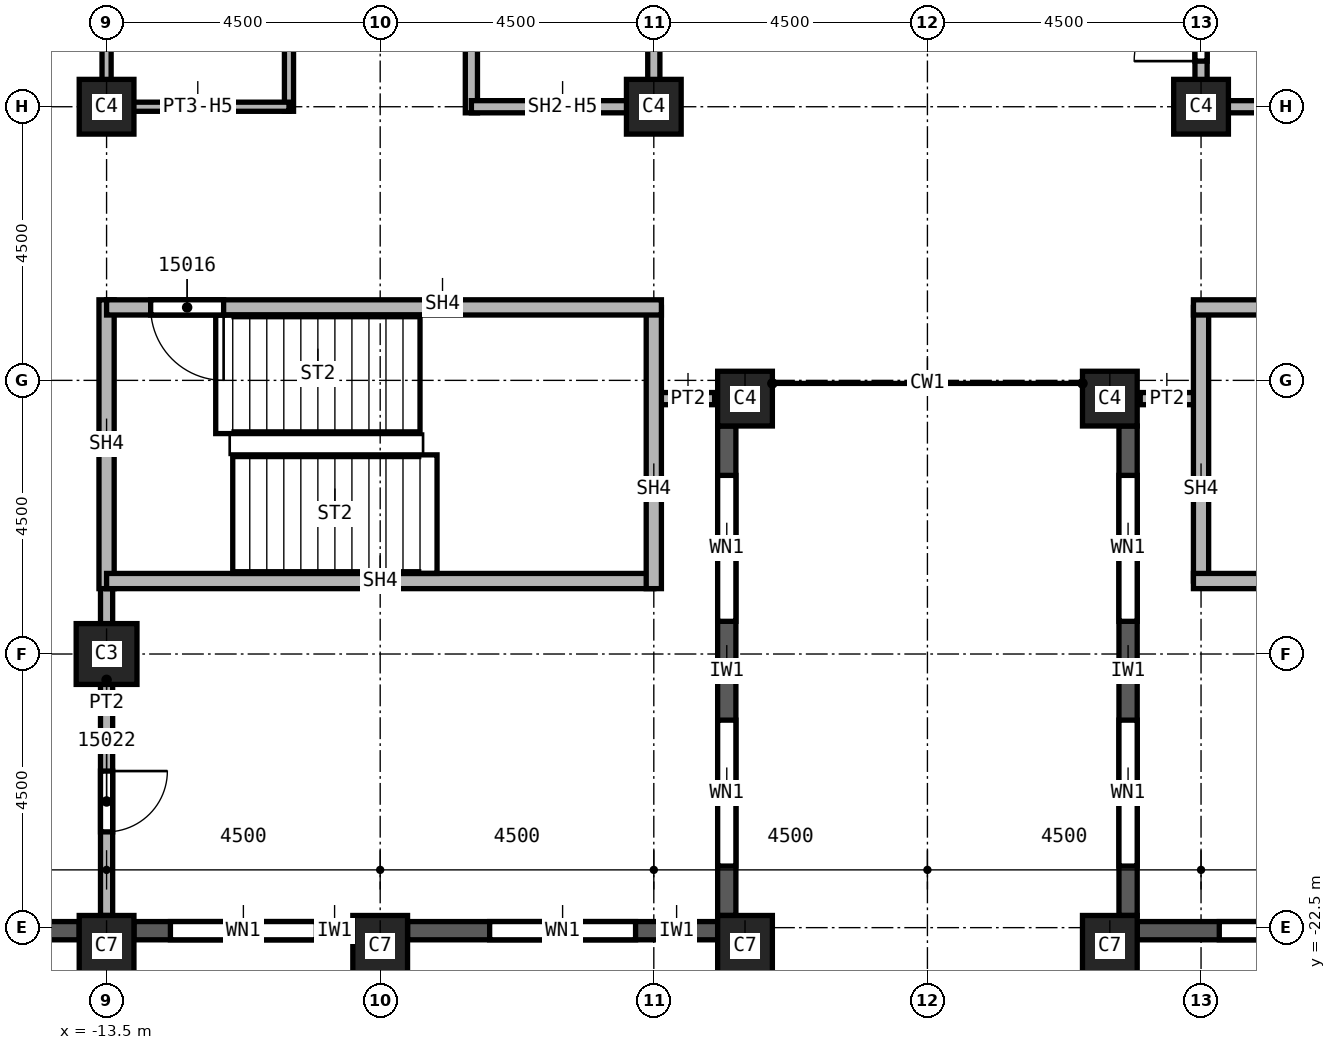
"""IFC4 building model, lengths in metres.
Left out: names, types, materials, properties, quantities, classifications, styles, units other than length and angle.
Written with IfcOpenShell. Run it as: python <this file> out.ifc"""

import sys

from ifc_helpers import new_model, si_unit, direction, frame, frame_2d, origin, origin_2d, place, context, subcontext, project, spatial, rectangle, extrude, element, fill, save


model = new_model("IFC4")
c1 = context("Model", 3, precision=1e-05, world=origin(), true_north=direction((0.0, 1.0)))
c2 = subcontext(c1, "Body", "Model", "MODEL_VIEW")
j1 = project(units=[si_unit("LENGTHUNIT", "METRE"), si_unit("PLANEANGLEUNIT", "RADIAN")], contexts=[c1])
p1 = place(None, origin())
s1 = spatial("IfcSite", under=j1, at=p1, CompositionType="ELEMENT")
p2 = place(p1, origin())
s2 = spatial("IfcBuilding", under=s1, at=p2, CompositionType="ELEMENT")
p3 = place(p2, frame((0.0, 0.0, 232.0)))
s3 = spatial("IfcBuildingStorey", under=s2, at=p3, CompositionType="ELEMENT", Elevation=232.0)
p4 = place(p3, frame((-13.5, -18.0, 0.0), z_axis=(0.0, 0.0, 1.0), x_axis=(1.0, 0.0, 0.0)))
e1 = element("IfcColumn", 1, at=p4, inside=s3, PredefinedType="COLUMN", context=c2, shape_type="SweptSolid", body=[
    extrude(rectangle(XDim=1.0, YDim=1.0, at=origin_2d()), origin(), (0.0, 0.0, 1.0), 3.6),
])
for number, where, z_axis, x_axis in (
    (2, (4.5, -9.0, 0.0), (0.0, 0.0, 1.0), (1.0, 0.0, 0.0)),
    (3, (-4.5, -9.0, 0.0), (0.0, 0.0, 1.0), (1.0, 0.0, 0.0)),
    (4, (-13.5, -9.0, 0.0), (0.0, 0.0, 1.0), (1.0, 0.0, 0.0)),
):
    element("IfcColumn", number, at=place(p3, frame(where, z_axis=z_axis, x_axis=x_axis)), inside=s3, PredefinedType="COLUMN", context=c2, shape_type="SweptSolid", body=[
        extrude(rectangle(XDim=0.9, YDim=0.9, at=origin_2d()), origin(), (0.0, 0.0, 1.0), 3.6),
    ])
for number, where, z_axis, x_axis in (
    (5, (3.0, -22.8, 0.0), (0.0, 0.0, 1.0), (1.0, 0.0, 0.0)),
    (6, (-3.0, -22.8, 0.0), (0.0, 0.0, 1.0), (1.0, 0.0, 0.0)),
    (7, (-9.0, -22.8, 0.0), (0.0, 0.0, 1.0), (1.0, 0.0, 0.0)),
    (8, (-13.5, -22.8, 0.0), (0.0, 0.0, 1.0), (1.0, 0.0, 0.0)),
):
    element("IfcColumn", number, at=place(p3, frame(where, z_axis=z_axis, x_axis=x_axis)), inside=s3, PredefinedType="COLUMN", context=c2, shape_type="SweptSolid", body=[
        extrude(rectangle(XDim=0.9, YDim=1.0, at=origin_2d()), origin(), (0.0, 0.0, 1.0), 3.6),
    ])
for number, where, z_axis, x_axis in (
    (9, (3.0, -13.8, 0.0), (0.0, 0.0, 1.0), (1.0, 0.0, 0.0)),
    (10, (-3.0, -13.8, 0.0), (0.0, 0.0, 1.0), (1.0, 0.0, 0.0)),
):
    element("IfcColumn", number, at=place(p3, frame(where, z_axis=z_axis, x_axis=x_axis)), inside=s3, PredefinedType="COLUMN", context=c2, shape_type="SweptSolid", body=[
        extrude(rectangle(XDim=0.9, YDim=0.9, at=origin_2d()), origin(), (0.0, 0.0, 1.0), 3.6),
    ])
p5 = place(p3, frame((-17.55, -22.55, 0.0), z_axis=(0.0, 0.0, 1.0), x_axis=(1.0, 0.0, 0.0)))
e11 = element("IfcWall", 11, at=p5, inside=s3, PredefinedType="SOLIDWALL", context=c2, shape_type="SweptSolid", body=[
    extrude(rectangle(XDim=3.6, YDim=0.3, at=frame_2d((1.8, 0.0))), origin(), (0.0, 0.0, 1.0), 3.0),
])
p6 = place(p5, frame((0.775, 0.0, 0.8)))
e12 = element("IfcOpeningElement", 12, at=p6, cuts=e11, PredefinedType="OPENING", context=c2, shape_type="SweptSolid", body=[
    extrude(rectangle(XDim=1.0, YDim=1.95, at=frame_2d((0.5, 0.975))), frame((0.0, 0.15, 0.0), z_axis=(0.0, -1.0, 0.0), x_axis=(1.0, 0.0, 0.0)), (0.0, 0.0, 1.0), 0.3),
])
p7 = place(p5, frame((2.375, 0.0, 0.8)))
e13 = element("IfcOpeningElement", 13, at=p7, cuts=e11, PredefinedType="OPENING", context=c2, shape_type="SweptSolid", body=[
    extrude(rectangle(XDim=0.6, YDim=1.95, at=frame_2d((0.3, 0.975))), frame((0.0, 0.15, 0.0), z_axis=(0.0, -1.0, 0.0), x_axis=(1.0, 0.0, 0.0)), (0.0, 0.0, 1.0), 0.3),
])
p8 = place(p3, frame((-13.05, -22.55, 0.0), z_axis=(0.0, 0.0, 1.0), x_axis=(1.0, 0.0, 0.0)))
e14 = element("IfcWall", 14, at=p8, inside=s3, PredefinedType="SOLIDWALL", context=c2, shape_type="SweptSolid", body=[
    extrude(rectangle(XDim=3.6, YDim=0.3, at=frame_2d((1.8, 0.0))), origin(), (0.0, 0.0, 1.0), 3.0),
])
p9 = place(p8, frame((0.6, 0.0, 0.8)))
e15 = element("IfcOpeningElement", 15, at=p9, cuts=e14, PredefinedType="OPENING", context=c2, shape_type="SweptSolid", body=[
    extrude(rectangle(XDim=2.4, YDim=1.95, at=frame_2d((1.2, 0.975))), frame((0.0, 0.15, 0.0), z_axis=(0.0, -1.0, 0.0), x_axis=(1.0, 0.0, 0.0)), (0.0, 0.0, 1.0), 0.3),
])
p10 = place(p3, frame((-8.55, -22.55, 0.0), z_axis=(0.0, 0.0, 1.0), x_axis=(1.0, 0.0, 0.0)))
e16 = element("IfcWall", 16, at=p10, inside=s3, PredefinedType="SOLIDWALL", context=c2, shape_type="SweptSolid", body=[
    extrude(rectangle(XDim=5.1, YDim=0.3, at=frame_2d((2.55, 0.0))), origin(), (0.0, 0.0, 1.0), 3.0),
])
p11 = place(p10, frame((1.35, 0.0, 0.8)))
e17 = element("IfcOpeningElement", 17, at=p11, cuts=e16, PredefinedType="OPENING", context=c2, shape_type="SweptSolid", body=[
    extrude(rectangle(XDim=2.4, YDim=1.95, at=frame_2d((1.2, 0.975))), frame((0.0, 0.15, 0.0), z_axis=(0.0, -1.0, 0.0), x_axis=(1.0, 0.0, 0.0)), (0.0, 0.0, 1.0), 0.3),
])
p12 = place(p3, frame((-3.3, -22.3, 0.0), z_axis=(0.0, 0.0, 1.0), x_axis=(0.0, 1.0, 0.0)))
e18 = element("IfcWall", 18, at=p12, inside=s3, PredefinedType="SOLIDWALL", context=c2, shape_type="SweptSolid", body=[
    extrude(rectangle(XDim=8.05, YDim=0.3, at=frame_2d((4.025, 0.0))), origin(), (0.0, 0.0, 1.0), 3.0),
])
p13 = place(p12, frame((0.812, 0.0, 0.8)))
e19 = element("IfcOpeningElement", 19, at=p13, cuts=e18, PredefinedType="OPENING", context=c2, shape_type="SweptSolid", body=[
    extrude(rectangle(XDim=2.4, YDim=1.95, at=frame_2d((1.2, 0.975))), frame((0.0, 0.15, 0.0), z_axis=(0.0, -1.0, 0.0), x_axis=(1.0, 0.0, 0.0)), (0.0, 0.0, 1.0), 0.3),
])
p14 = place(p12, frame((4.837, 0.0, 0.8)))
e20 = element("IfcOpeningElement", 20, at=p14, cuts=e18, PredefinedType="OPENING", context=c2, shape_type="SweptSolid", body=[
    extrude(rectangle(XDim=2.4, YDim=1.95, at=frame_2d((1.2, 0.975))), frame((0.0, 0.15, 0.0), z_axis=(0.0, -1.0, 0.0), x_axis=(1.0, 0.0, 0.0)), (0.0, 0.0, 1.0), 0.3),
])
p15 = place(p3, frame((3.3, -14.25, 0.0), z_axis=(0.0, 0.0, 1.0), x_axis=(0.0, -1.0, 0.0)))
e21 = element("IfcWall", 21, at=p15, inside=s3, PredefinedType="SOLIDWALL", context=c2, shape_type="SweptSolid", body=[
    extrude(rectangle(XDim=8.05, YDim=0.3, at=frame_2d((4.025, 0.0))), origin(), (0.0, 0.0, 1.0), 3.0),
])
p16 = place(p15, frame((0.812, 0.0, 0.8)))
e22 = element("IfcOpeningElement", 22, at=p16, cuts=e21, PredefinedType="OPENING", context=c2, shape_type="SweptSolid", body=[
    extrude(rectangle(XDim=2.4, YDim=1.95, at=frame_2d((1.2, 0.975))), frame((0.0, 0.15, 0.0), z_axis=(0.0, -1.0, 0.0), x_axis=(1.0, 0.0, 0.0)), (0.0, 0.0, 1.0), 0.3),
])
p17 = place(p15, frame((4.837, 0.0, 0.8)))
e23 = element("IfcOpeningElement", 23, at=p17, cuts=e21, PredefinedType="OPENING", context=c2, shape_type="SweptSolid", body=[
    extrude(rectangle(XDim=2.4, YDim=1.95, at=frame_2d((1.2, 0.975))), frame((0.0, 0.15, 0.0), z_axis=(0.0, -1.0, 0.0), x_axis=(1.0, 0.0, 0.0)), (0.0, 0.0, 1.0), 0.3),
])
p18 = place(p3, frame((3.45, -22.55, 0.0), z_axis=(0.0, 0.0, 1.0), x_axis=(1.0, 0.0, 0.0)))
e24 = element("IfcWall", 24, at=p18, inside=s3, PredefinedType="SOLIDWALL", context=c2, shape_type="SweptSolid", body=[
    extrude(rectangle(XDim=5.1, YDim=0.3, at=frame_2d((2.55, 0.0))), origin(), (0.0, 0.0, 1.0), 3.0),
])
p19 = place(p18, frame((1.35, 0.0, 0.8)))
e25 = element("IfcOpeningElement", 25, at=p19, cuts=e24, PredefinedType="OPENING", context=c2, shape_type="SweptSolid", body=[
    extrude(rectangle(XDim=2.4, YDim=1.95, at=frame_2d((1.2, 0.975))), frame((0.0, 0.15, 0.0), z_axis=(0.0, -1.0, 0.0), x_axis=(1.0, 0.0, 0.0)), (0.0, 0.0, 1.0), 0.3),
])
p20 = place(p3, frame((-13.5, -16.675, 0.0), z_axis=(0.0, 0.0, 1.0), x_axis=(0.0, -1.0, 0.0)))
e26 = element("IfcWall", 26, at=p20, inside=s3, PredefinedType="PARTITIONING", context=c2, shape_type="SweptSolid", body=[
    extrude(rectangle(XDim=5.625, YDim=0.2, at=frame_2d((2.812, 0.0))), origin(), (0.0, 0.0, 1.0), 3.6),
])
p21 = place(p20, frame((3.25, 0.0, 0.0)))
e27 = element("IfcOpeningElement", 27, at=p21, cuts=e26, PredefinedType="OPENING", context=c2, shape_type="SweptSolid", body=[
    extrude(rectangle(XDim=1.0, YDim=2.1, at=frame_2d((0.5, 1.05))), frame((0.0, 0.1, 0.0), z_axis=(0.0, -1.0, 0.0), x_axis=(1.0, 0.0, 0.0)), (0.0, 0.0, 1.0), 0.2),
])
for number, where, z_axis, x_axis in (
    (28, (-3.5, -13.8, 0.0), (0.0, 0.0, 1.0), (-1.0, 0.0, 0.0)),
    (29, (4.5, -13.8, 0.0), (0.0, 0.0, 1.0), (-1.0, 0.0, 0.0)),
):
    element("IfcWall", number, at=place(p3, frame(where, z_axis=z_axis, x_axis=x_axis)), inside=s3, PredefinedType="PARTITIONING", context=c2, shape_type="SweptSolid", body=[
        extrude(rectangle(XDim=1.0, YDim=0.2, at=frame_2d((0.5, 0.0))), origin(), (0.0, 0.0, 1.0), 3.6),
    ])
p22 = place(p3, frame((-7.5, -9.1, 0.0), z_axis=(0.0, 0.0, 1.0), x_axis=(0.0, 1.0, 0.0)))
e30 = element("IfcWall", 30, at=p22, inside=s3, PredefinedType="SOLIDWALL", context=c2, shape_type="SweptSolid", body=[
    extrude(rectangle(XDim=6.225, YDim=0.2, at=frame_2d((3.113, 0.0))), origin(), (0.0, 0.0, 1.0), 3.6),
])
p23 = place(p3, frame((-4.5, -9.0, 0.0), z_axis=(0.0, 0.0, 1.0), x_axis=(-1.0, 0.0, 0.0)))
e31 = element("IfcWall", 31, at=p23, inside=s3, PredefinedType="SOLIDWALL", context=c2, shape_type="SweptSolid", body=[
    extrude(rectangle(XDim=3.0, YDim=0.2, at=frame_2d((1.5, 0.0))), origin(), (0.0, 0.0, 1.0), 2.838),
])
p24 = place(p3, frame((-4.5, 0.0, 0.0), z_axis=(0.0, 0.0, 1.0), x_axis=(0.0, -1.0, 0.0)))
e32 = element("IfcWall", 32, at=p24, inside=s3, PredefinedType="SOLIDWALL", context=c2, shape_type="SweptSolid", body=[
    extrude(rectangle(XDim=9.1, YDim=0.2, at=frame_2d((4.55, 0.0))), origin(), (0.0, 0.0, 1.0), 2.838),
])
p25 = place(p24, frame((1.3, 0.0, 0.0)))
e33 = element("IfcOpeningElement", 33, at=p25, cuts=e32, PredefinedType="OPENING", context=c2, shape_type="SweptSolid", body=[
    extrude(rectangle(XDim=1.1, YDim=2.1, at=frame_2d((0.55, 1.05))), frame((0.0, 0.1, 0.0), z_axis=(0.0, -1.0, 0.0), x_axis=(1.0, 0.0, 0.0)), (0.0, 0.0, 1.0), 0.2),
])
p26 = place(p3, frame((4.5, -9.1, 0.0), z_axis=(0.0, 0.0, 1.0), x_axis=(0.0, 1.0, 0.0)))
e34 = element("IfcWall", 34, at=p26, inside=s3, PredefinedType="SOLIDWALL", context=c2, shape_type="SweptSolid", body=[
    extrude(rectangle(XDim=3.1, YDim=0.2, at=frame_2d((1.55, 0.0))), origin(), (0.0, 0.0, 1.0), 2.838),
])
p27 = place(p26, frame((0.85, 0.0, 0.0)))
e35 = element("IfcOpeningElement", 35, at=p27, cuts=e34, PredefinedType="OPENING", context=c2, shape_type="SweptSolid", body=[
    extrude(rectangle(XDim=1.1, YDim=2.1, at=frame_2d((0.55, 1.05))), frame((0.0, 0.1, 0.0), z_axis=(0.0, -1.0, 0.0), x_axis=(1.0, 0.0, 0.0)), (0.0, 0.0, 1.0), 0.2),
])
p28 = place(p3, frame((7.5, -9.0, 0.0), z_axis=(0.0, 0.0, 1.0), x_axis=(-1.0, 0.0, 0.0)))
e36 = element("IfcWall", 36, at=p28, inside=s3, PredefinedType="SOLIDWALL", context=c2, shape_type="SweptSolid", body=[
    extrude(rectangle(XDim=3.0, YDim=0.2, at=frame_2d((1.5, 0.0))), origin(), (0.0, 0.0, 1.0), 2.838),
])
p29 = place(p3, frame((-13.5, -12.175, 0.0), z_axis=(0.0, 0.0, 1.0), x_axis=(0.0, -1.0, 0.0)))
e37 = element("IfcWall", 37, at=p29, inside=s3, PredefinedType="SOLIDWALL", context=c2, shape_type="SweptSolid", body=[
    extrude(rectangle(XDim=4.75, YDim=0.25, at=frame_2d((2.375, 0.0))), origin(), (0.0, 0.0, 1.0), 3.6),
])
p30 = place(p3, frame((-4.5, -16.8, 0.0), z_axis=(0.0, 0.0, 1.0), x_axis=(-1.0, 0.0, 0.0)))
e38 = element("IfcWall", 38, at=p30, inside=s3, PredefinedType="SOLIDWALL", context=c2, shape_type="SweptSolid", body=[
    extrude(rectangle(XDim=9.0, YDim=0.25, at=frame_2d((4.5, 0.0))), origin(), (0.0, 0.0, 1.0), 3.6),
])
p31 = place(p3, frame((-4.5, -12.3, 0.0), z_axis=(0.0, 0.0, 1.0), x_axis=(0.0, -1.0, 0.0)))
e39 = element("IfcWall", 39, at=p31, inside=s3, PredefinedType="SOLIDWALL", context=c2, shape_type="SweptSolid", body=[
    extrude(rectangle(XDim=4.625, YDim=0.25, at=frame_2d((2.312, 0.0))), origin(), (0.0, 0.0, 1.0), 3.6),
])
p32 = place(p3, frame((-4.375, -12.3, 0.0), z_axis=(0.0, 0.0, 1.0), x_axis=(-1.0, 0.0, 0.0)))
e40 = element("IfcWall", 40, at=p32, inside=s3, PredefinedType="SOLIDWALL", context=c2, shape_type="SweptSolid", body=[
    extrude(rectangle(XDim=9.125, YDim=0.25, at=frame_2d((4.562, 0.0))), origin(), (0.0, 0.0, 1.0), 3.6),
])
p33 = place(p32, frame((7.2, 0.0, 0.0)))
e41 = element("IfcOpeningElement", 41, at=p33, cuts=e40, PredefinedType="OPENING", context=c2, shape_type="SweptSolid", body=[
    extrude(rectangle(XDim=1.2, YDim=2.1, at=frame_2d((0.6, 1.05))), frame((0.0, 0.125, 0.0), z_axis=(0.0, -1.0, 0.0), x_axis=(1.0, 0.0, 0.0)), (0.0, 0.0, 1.0), 0.25),
])
p34 = place(p3, frame((4.5, -16.8, 0.0), z_axis=(0.0, 0.0, 1.0), x_axis=(0.0, 1.0, 0.0)))
e42 = element("IfcWall", 42, at=p34, inside=s3, PredefinedType="SOLIDWALL", context=c2, shape_type="SweptSolid", body=[
    extrude(rectangle(XDim=4.5, YDim=0.25, at=frame_2d((2.25, 0.0))), origin(), (0.0, 0.0, 1.0), 3.6),
])
p35 = place(p3, frame((13.5, -16.8, 0.0), z_axis=(0.0, 0.0, 1.0), x_axis=(-1.0, 0.0, 0.0)))
e43 = element("IfcWall", 43, at=p35, inside=s3, PredefinedType="SOLIDWALL", context=c2, shape_type="SweptSolid", body=[
    extrude(rectangle(XDim=9.125, YDim=0.25, at=frame_2d((4.562, 0.0))), origin(), (0.0, 0.0, 1.0), 3.6),
])
p36 = place(p3, frame((13.5, -12.3, 0.0), z_axis=(0.0, 0.0, 1.0), x_axis=(-1.0, 0.0, 0.0)))
e44 = element("IfcWall", 44, at=p36, inside=s3, PredefinedType="SOLIDWALL", context=c2, shape_type="SweptSolid", body=[
    extrude(rectangle(XDim=9.125, YDim=0.25, at=frame_2d((4.562, 0.0))), origin(), (0.0, 0.0, 1.0), 3.6),
])
p37 = place(p36, frame((0.6, 0.0, 0.0)))
e45 = element("IfcOpeningElement", 45, at=p37, cuts=e44, PredefinedType="OPENING", context=c2, shape_type="SweptSolid", body=[
    extrude(rectangle(XDim=1.2, YDim=2.1, at=frame_2d((0.6, 1.05))), frame((0.0, 0.125, 0.0), z_axis=(0.0, -1.0, 0.0), x_axis=(1.0, 0.0, 0.0)), (0.0, 0.0, 1.0), 0.25),
])
p38 = place(p3, frame((-13.5, -9.075, 0.0), z_axis=(0.0, 0.0, 1.0), x_axis=(0.0, 1.0, 0.0)))
e46 = element("IfcWall", 46, at=p38, inside=s3, PredefinedType="PARTITIONING", context=c2, shape_type="SweptSolid", body=[
    extrude(rectangle(XDim=6.075, YDim=0.15, at=frame_2d((3.038, 0.0))), origin(), (0.0, 0.0, 1.0), 2.838),
])
p39 = place(p3, frame((-10.5, -9.075, 0.0), z_axis=(0.0, 0.0, 1.0), x_axis=(0.0, 1.0, 0.0)))
e47 = element("IfcWall", 47, at=p39, inside=s3, PredefinedType="PARTITIONING", context=c2, shape_type="SweptSolid", body=[
    extrude(rectangle(XDim=6.2, YDim=0.15, at=frame_2d((3.1, 0.0))), origin(), (0.0, 0.0, 1.0), 3.6),
])
p40 = place(p39, frame((4.45, 0.0, 0.0)))
e48 = element("IfcOpeningElement", 48, at=p40, cuts=e47, PredefinedType="OPENING", context=c2, shape_type="SweptSolid", body=[
    extrude(rectangle(XDim=0.9, YDim=2.1, at=frame_2d((0.45, 1.05))), frame((0.0, 0.075, 0.0), z_axis=(0.0, -1.0, 0.0), x_axis=(1.0, 0.0, 0.0)), (0.0, 0.0, 1.0), 0.15),
])
p41 = place(p3, frame((-10.5, -9.0, 0.0), z_axis=(0.0, 0.0, 1.0), x_axis=(-1.0, 0.0, 0.0)))
e49 = element("IfcWall", 49, at=p41, inside=s3, PredefinedType="PARTITIONING", context=c2, shape_type="SweptSolid", body=[
    extrude(rectangle(XDim=3.0, YDim=0.15, at=frame_2d((1.5, 0.0))), origin(), (0.0, 0.0, 1.0), 2.838),
])
p42 = place(p9, origin())
e50 = element("IfcWindow", 50, at=p42, inside=s3, PartitioningType="SINGLE_PANEL", PredefinedType="WINDOW", context=c2, shape_type="SweptSolid", body=[
    extrude(rectangle(XDim=2.4, YDim=1.95, at=frame_2d((1.2, 0.975))), frame((0.0, 0.03, 0.0), z_axis=(0.0, -1.0, 0.0), x_axis=(1.0, 0.0, 0.0)), (0.0, 0.0, 1.0), 0.06),
])
fill(e15, e50)
p43 = place(p11, origin())
e51 = element("IfcWindow", 51, at=p43, inside=s3, PartitioningType="SINGLE_PANEL", PredefinedType="WINDOW", context=c2, shape_type="SweptSolid", body=[
    extrude(rectangle(XDim=2.4, YDim=1.95, at=frame_2d((1.2, 0.975))), frame((0.0, 0.03, 0.0), z_axis=(0.0, -1.0, 0.0), x_axis=(1.0, 0.0, 0.0)), (0.0, 0.0, 1.0), 0.06),
])
fill(e17, e51)
p44 = place(p13, origin())
e52 = element("IfcWindow", 52, at=p44, inside=s3, PartitioningType="SINGLE_PANEL", PredefinedType="WINDOW", context=c2, shape_type="SweptSolid", body=[
    extrude(rectangle(XDim=2.4, YDim=1.95, at=frame_2d((1.2, 0.975))), frame((0.0, 0.03, 0.0), z_axis=(0.0, -1.0, 0.0), x_axis=(1.0, 0.0, 0.0)), (0.0, 0.0, 1.0), 0.06),
])
fill(e19, e52)
p45 = place(p14, origin())
e53 = element("IfcWindow", 53, at=p45, inside=s3, PartitioningType="SINGLE_PANEL", PredefinedType="WINDOW", context=c2, shape_type="SweptSolid", body=[
    extrude(rectangle(XDim=2.4, YDim=1.95, at=frame_2d((1.2, 0.975))), frame((0.0, 0.03, 0.0), z_axis=(0.0, -1.0, 0.0), x_axis=(1.0, 0.0, 0.0)), (0.0, 0.0, 1.0), 0.06),
])
fill(e20, e53)
p46 = place(p16, origin())
e54 = element("IfcWindow", 54, at=p46, inside=s3, PartitioningType="SINGLE_PANEL", PredefinedType="WINDOW", context=c2, shape_type="SweptSolid", body=[
    extrude(rectangle(XDim=2.4, YDim=1.95, at=frame_2d((1.2, 0.975))), frame((0.0, 0.03, 0.0), z_axis=(0.0, -1.0, 0.0), x_axis=(1.0, 0.0, 0.0)), (0.0, 0.0, 1.0), 0.06),
])
fill(e22, e54)
p47 = place(p17, origin())
e55 = element("IfcWindow", 55, at=p47, inside=s3, PartitioningType="SINGLE_PANEL", PredefinedType="WINDOW", context=c2, shape_type="SweptSolid", body=[
    extrude(rectangle(XDim=2.4, YDim=1.95, at=frame_2d((1.2, 0.975))), frame((0.0, 0.03, 0.0), z_axis=(0.0, -1.0, 0.0), x_axis=(1.0, 0.0, 0.0)), (0.0, 0.0, 1.0), 0.06),
])
fill(e23, e55)
p48 = place(p19, origin())
e56 = element("IfcWindow", 56, at=p48, inside=s3, PartitioningType="SINGLE_PANEL", PredefinedType="WINDOW", context=c2, shape_type="SweptSolid", body=[
    extrude(rectangle(XDim=2.4, YDim=1.95, at=frame_2d((1.2, 0.975))), frame((0.0, 0.03, 0.0), z_axis=(0.0, -1.0, 0.0), x_axis=(1.0, 0.0, 0.0)), (0.0, 0.0, 1.0), 0.06),
])
fill(e25, e56)
p49 = place(p27, origin())
e57 = element("IfcDoor", 57, at=p49, inside=s3, OperationType="SINGLE_SWING_LEFT", PredefinedType="DOOR", context=c2, shape_type="SweptSolid", body=[
    extrude(rectangle(XDim=1.1, YDim=2.1, at=frame_2d((0.55, 1.05))), frame((0.0, 0.025, 0.0), z_axis=(0.0, -1.0, 0.0), x_axis=(1.0, 0.0, 0.0)), (0.0, 0.0, 1.0), 0.05),
])
fill(e35, e57)
p50 = place(p33, origin())
e58 = element("IfcDoor", 58, at=p50, inside=s3, OperationType="SINGLE_SWING_LEFT", PredefinedType="DOOR", context=c2, shape_type="SweptSolid", body=[
    extrude(rectangle(XDim=1.2, YDim=2.1, at=frame_2d((0.6, 1.05))), frame((0.0, 0.025, 0.0), z_axis=(0.0, -1.0, 0.0), x_axis=(1.0, 0.0, 0.0)), (0.0, 0.0, 1.0), 0.05),
])
fill(e41, e58)
p51 = place(p21, origin())
e59 = element("IfcDoor", 59, at=p51, inside=s3, OperationType="SINGLE_SWING_LEFT", PredefinedType="DOOR", context=c2, shape_type="SweptSolid", body=[
    extrude(rectangle(XDim=1.0, YDim=2.1, at=frame_2d((0.5, 1.05))), frame((0.0, 0.025, 0.0), z_axis=(0.0, -1.0, 0.0), x_axis=(1.0, 0.0, 0.0)), (0.0, 0.0, 1.0), 0.05),
])
fill(e27, e59)
save(model, sys.argv[1])
